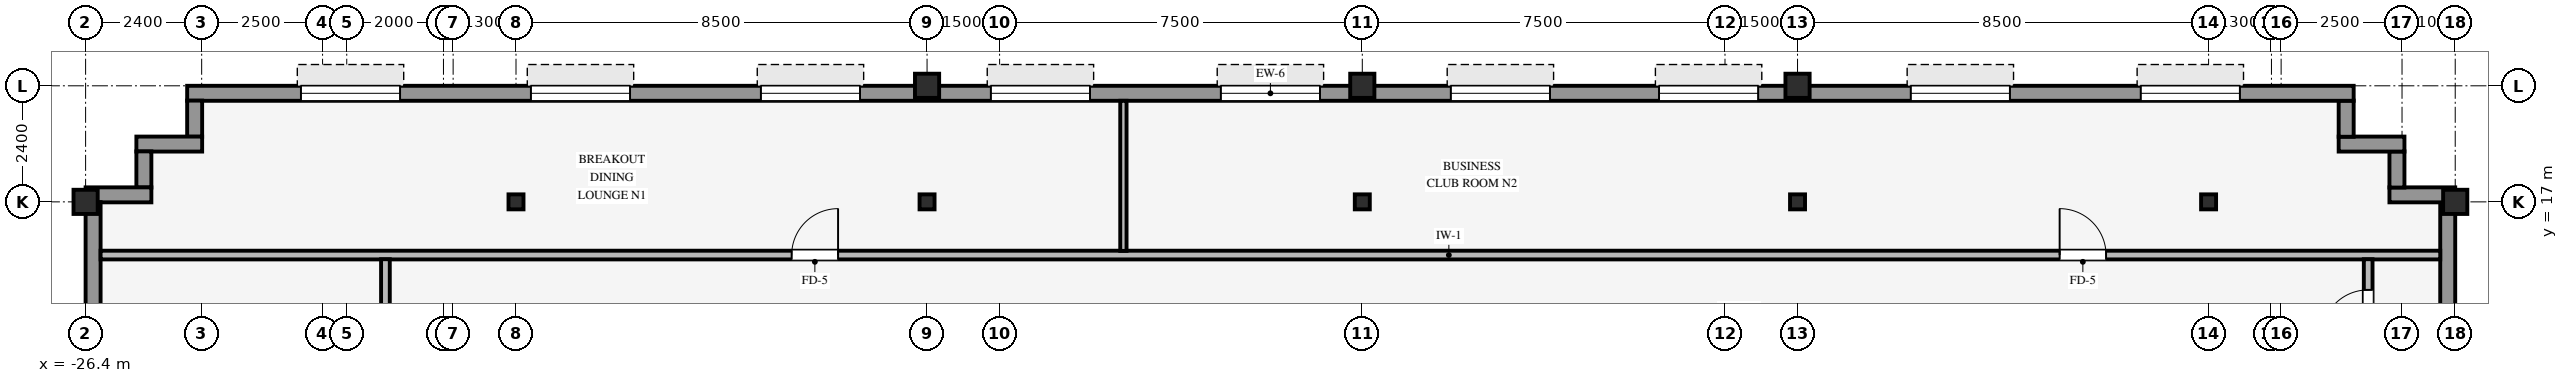
"""IFC4 building model, lengths in metres.
Left out: names, types, materials, properties, quantities, classifications, styles, units other than length and angle.
Written with IfcOpenShell. Run it as: python <this file> out.ifc"""

import sys

from ifc_helpers import new_model, si_unit, direction, frame, frame_2d, origin, origin_2d, place, context, subcontext, project, spatial, rectangle, hollow_rectangle, i_section, extrude, source, transform, mapped, element, fill, save


model = new_model("IFC4")
c1 = context("Model", 3, precision=1e-05, world=origin(), true_north=direction((0.0, 1.0)))
c2 = subcontext(c1, "Body", "Model", "MODEL_VIEW")
j1 = project(units=[si_unit("LENGTHUNIT", "METRE"), si_unit("PLANEANGLEUNIT", "RADIAN")], contexts=[c1])
p1 = place(None, origin())
s1 = spatial("IfcSite", under=j1, at=p1, CompositionType="ELEMENT")
p2 = place(p1, origin())
s2 = spatial("IfcBuilding", under=s1, at=p2, CompositionType="ELEMENT")
p3 = place(p2, frame((0.0, 0.0, 190.9)))
s3 = spatial("IfcBuildingStorey", under=s2, at=p3, CompositionType="ELEMENT", Elevation=190.9)
for number, where, z_axis, x_axis in (
    (1, (-26.4, 17.0, 0.0), (0.0, 0.0, 1.0), (1.0, 0.0, 0.0)),
    (2, (22.6, 17.0, 0.0), (0.0, 0.0, 1.0), (1.0, 0.0, 0.0)),
    (3, (-9.0, 19.4, 0.0), (0.0, 0.0, 1.0), (1.0, 0.0, 0.0)),
    (4, (0.0, 19.4, 0.0), (0.0, 0.0, 1.0), (1.0, 0.0, 0.0)),
    (5, (9.0, 19.4, 0.0), (0.0, 0.0, 1.0), (1.0, 0.0, 0.0)),
):
    element("IfcColumn", number, at=place(p3, frame(where, z_axis=z_axis, x_axis=x_axis)), inside=s3, PredefinedType="COLUMN", context=c2, shape_type="SweptSolid", body=[
        extrude(hollow_rectangle(XDim=0.5, YDim=0.5, WallThickness=0.032, InnerFilletRadius=0.032, OuterFilletRadius=0.064, at=origin_2d()), origin(), (0.0, 0.0, 1.0), 3.37),
    ])
for number, where, z_axis, x_axis in (
    (6, (0.0, 17.0, 0.0), (0.0, 0.0, 1.0), (1.0, 0.0, 0.0)),
    (7, (-17.5, 17.0, 0.0), (0.0, 0.0, 1.0), (1.0, 0.0, 0.0)),
    (8, (-9.0, 17.0, 0.0), (0.0, 0.0, 1.0), (1.0, 0.0, 0.0)),
    (9, (9.0, 17.0, 0.0), (0.0, 0.0, 1.0), (1.0, 0.0, 0.0)),
    (10, (17.5, 17.0, 0.0), (0.0, 0.0, 1.0), (1.0, 0.0, 0.0)),
):
    element("IfcColumn", number, at=place(p3, frame(where, z_axis=z_axis, x_axis=x_axis)), inside=s3, PredefinedType="COLUMN", context=c2, shape_type="SweptSolid", body=[
        extrude(i_section(OverallWidth=0.31, OverallDepth=0.31, WebThickness=0.015, FlangeThickness=0.015, FilletRadius=0.015, at=origin_2d()), origin(), (0.0, 0.0, 1.0), 3.37),
    ])
p4 = place(p3, frame((22.445, -20.794, 0.0), z_axis=(0.0, 0.0, 1.0), x_axis=(0.0, 1.0, 0.0)))
e11 = element("IfcWall", 11, at=p4, inside=s3, PredefinedType="STANDARD", context=c2, shape_type="SweptSolid", body=[
    extrude(rectangle(XDim=37.788, YDim=0.31, at=frame_2d((18.894, 0.0))), origin(), (0.0, 0.0, 1.0), 2.705),
])
p5 = place(p4, frame((16.474, 0.0, 0.0), z_axis=(0.0, 0.0, 1.0), x_axis=(-1.0, 0.0, 0.0)))
e12 = element("IfcOpeningElement", 12, at=p5, cuts=e11, PredefinedType="OPENING", context=c2, shape_type="SweptSolid", body=[
    extrude(rectangle(XDim=0.98, YDim=2.15, at=frame_2d((0.49, 1.075))), frame((0.0, 0.165, 0.0), z_axis=(0.0, -1.0, 0.0), x_axis=(1.0, 0.0, 0.0)), (0.0, 0.0, 1.0), 0.33),
])
p6 = place(p4, frame((1.581, 0.0, 0.8)))
e13 = element("IfcOpeningElement", 13, at=p6, cuts=e11, PredefinedType="OPENING", context=c2, shape_type="SweptSolid", body=[
    extrude(rectangle(XDim=1.25, YDim=1.52, at=frame_2d((0.625, 0.76))), frame((0.0, 0.165, 0.0), z_axis=(0.0, -1.0, 0.0), x_axis=(1.0, 0.0, 0.0)), (0.0, 0.0, 1.0), 0.33),
])
p7 = place(p4, frame((8.044, 0.0, 0.8)))
e14 = element("IfcOpeningElement", 14, at=p7, cuts=e11, PredefinedType="OPENING", context=c2, shape_type="SweptSolid", body=[
    extrude(rectangle(XDim=1.25, YDim=1.52, at=frame_2d((0.625, 0.76))), frame((0.0, 0.165, 0.0), z_axis=(0.0, -1.0, 0.0), x_axis=(1.0, 0.0, 0.0)), (0.0, 0.0, 1.0), 0.33),
])
p8 = place(p4, frame((13.156, 0.0, 0.8)))
e15 = element("IfcOpeningElement", 15, at=p8, cuts=e11, PredefinedType="OPENING", context=c2, shape_type="SweptSolid", body=[
    extrude(rectangle(XDim=1.25, YDim=1.52, at=frame_2d((0.625, 0.76))), frame((0.0, 0.165, 0.0), z_axis=(0.0, -1.0, 0.0), x_axis=(1.0, 0.0, 0.0)), (0.0, 0.0, 1.0), 0.33),
])
p9 = place(p4, frame((18.269, 0.0, 0.8)))
e16 = element("IfcOpeningElement", 16, at=p9, cuts=e11, PredefinedType="OPENING", context=c2, shape_type="SweptSolid", body=[
    extrude(rectangle(XDim=1.25, YDim=1.52, at=frame_2d((0.625, 0.76))), frame((0.0, 0.165, 0.0), z_axis=(0.0, -1.0, 0.0), x_axis=(1.0, 0.0, 0.0)), (0.0, 0.0, 1.0), 0.33),
])
p10 = place(p4, frame((22.482, 0.0, 0.8)))
e17 = element("IfcOpeningElement", 17, at=p10, cuts=e11, PredefinedType="OPENING", context=c2, shape_type="SweptSolid", body=[
    extrude(rectangle(XDim=1.25, YDim=1.52, at=frame_2d((0.625, 0.76))), frame((0.0, 0.165, 0.0), z_axis=(0.0, -1.0, 0.0), x_axis=(1.0, 0.0, 0.0)), (0.0, 0.0, 1.0), 0.33),
])
p11 = place(p4, frame((28.044, 0.0, 0.8)))
e18 = element("IfcOpeningElement", 18, at=p11, cuts=e11, PredefinedType="OPENING", context=c2, shape_type="SweptSolid", body=[
    extrude(rectangle(XDim=1.25, YDim=1.52, at=frame_2d((0.625, 0.76))), frame((0.0, 0.165, 0.0), z_axis=(0.0, -1.0, 0.0), x_axis=(1.0, 0.0, 0.0)), (0.0, 0.0, 1.0), 0.33),
])
p12 = place(p4, frame((33.607, 0.0, 0.8)))
e19 = element("IfcOpeningElement", 19, at=p12, cuts=e11, PredefinedType="OPENING", context=c2, shape_type="SweptSolid", body=[
    extrude(rectangle(XDim=1.25, YDim=1.52, at=frame_2d((0.625, 0.76))), frame((0.0, 0.165, 0.0), z_axis=(0.0, -1.0, 0.0), x_axis=(1.0, 0.0, 0.0)), (0.0, 0.0, 1.0), 0.33),
])
p13 = place(p3, frame((21.24, 17.145, 0.0), z_axis=(0.0, 0.0, 1.0), x_axis=(1.0, 0.0, 0.0)))
e20 = element("IfcWall", 20, at=p13, inside=s3, PredefinedType="STANDARD", context=c2, shape_type="SweptSolid", body=[
    extrude(rectangle(XDim=1.36, YDim=0.31, at=frame_2d((0.68, 0.0))), origin(), (0.0, 0.0, 1.0), 2.816),
])
p14 = place(p3, frame((21.395, 17.296, 0.0), z_axis=(0.0, 0.0, 1.0), x_axis=(0.0, 1.0, 0.0)))
e21 = element("IfcWall", 21, at=p14, inside=s3, PredefinedType="STANDARD", context=c2, shape_type="SweptSolid", body=[
    extrude(rectangle(XDim=0.748, YDim=0.31, at=frame_2d((0.374, 0.0))), origin(), (0.0, 0.0, 1.0), 2.816),
])
p15 = place(p3, frame((20.19, 18.195, 0.0), z_axis=(0.0, 0.0, 1.0), x_axis=(1.0, 0.0, 0.0)))
e22 = element("IfcWall", 22, at=p15, inside=s3, PredefinedType="STANDARD", context=c2, shape_type="SweptSolid", body=[
    extrude(rectangle(XDim=1.36, YDim=0.31, at=frame_2d((0.68, 0.0))), origin(), (0.0, 0.0, 1.0), 2.816),
])
p16 = place(p3, frame((20.345, 18.346, 0.0), z_axis=(0.0, 0.0, 1.0), x_axis=(0.0, 1.0, 0.0)))
e23 = element("IfcWall", 23, at=p16, inside=s3, PredefinedType="STANDARD", context=c2, shape_type="SweptSolid", body=[
    extrude(rectangle(XDim=0.748, YDim=0.31, at=frame_2d((0.374, 0.0))), origin(), (0.0, 0.0, 1.0), 2.816),
])
p17 = place(p3, frame((-24.3, 19.245, 0.0), z_axis=(0.0, 0.0, 1.0), x_axis=(1.0, 0.0, 0.0)))
e24 = element("IfcWall", 24, at=p17, inside=s3, PredefinedType="STANDARD", context=c2, shape_type="SweptSolid", body=[
    extrude(rectangle(XDim=44.8, YDim=0.31, at=frame_2d((22.4, 0.0))), origin(), (0.0, 0.0, 1.0), 2.705),
])
p18 = place(p17, frame((2.353, 0.0, 0.8)))
e25 = element("IfcOpeningElement", 25, at=p18, cuts=e24, PredefinedType="OPENING", context=c2, shape_type="SweptSolid", body=[
    extrude(rectangle(XDim=2.05, YDim=1.52, at=frame_2d((1.025, 0.76))), frame((0.0, 0.165, 0.0), z_axis=(0.0, -1.0, 0.0), x_axis=(1.0, 0.0, 0.0)), (0.0, 0.0, 1.0), 0.33),
])
p19 = place(p17, frame((7.108, 0.0, 0.8)))
e26 = element("IfcOpeningElement", 26, at=p19, cuts=e24, PredefinedType="OPENING", context=c2, shape_type="SweptSolid", body=[
    extrude(rectangle(XDim=2.05, YDim=1.52, at=frame_2d((1.025, 0.76))), frame((0.0, 0.165, 0.0), z_axis=(0.0, -1.0, 0.0), x_axis=(1.0, 0.0, 0.0)), (0.0, 0.0, 1.0), 0.33),
])
p20 = place(p17, frame((11.864, 0.0, 0.8)))
e27 = element("IfcOpeningElement", 27, at=p20, cuts=e24, PredefinedType="OPENING", context=c2, shape_type="SweptSolid", body=[
    extrude(rectangle(XDim=2.05, YDim=1.52, at=frame_2d((1.025, 0.76))), frame((0.0, 0.165, 0.0), z_axis=(0.0, -1.0, 0.0), x_axis=(1.0, 0.0, 0.0)), (0.0, 0.0, 1.0), 0.33),
])
p21 = place(p17, frame((16.619, 0.0, 0.8)))
e28 = element("IfcOpeningElement", 28, at=p21, cuts=e24, PredefinedType="OPENING", context=c2, shape_type="SweptSolid", body=[
    extrude(rectangle(XDim=2.05, YDim=1.52, at=frame_2d((1.025, 0.76))), frame((0.0, 0.165, 0.0), z_axis=(0.0, -1.0, 0.0), x_axis=(1.0, 0.0, 0.0)), (0.0, 0.0, 1.0), 0.33),
])
p22 = place(p17, frame((21.375, 0.0, 0.8)))
e29 = element("IfcOpeningElement", 29, at=p22, cuts=e24, PredefinedType="OPENING", context=c2, shape_type="SweptSolid", body=[
    extrude(rectangle(XDim=2.05, YDim=1.52, at=frame_2d((1.025, 0.76))), frame((0.0, 0.165, 0.0), z_axis=(0.0, -1.0, 0.0), x_axis=(1.0, 0.0, 0.0)), (0.0, 0.0, 1.0), 0.33),
])
p23 = place(p17, frame((26.131, 0.0, 0.8)))
e30 = element("IfcOpeningElement", 30, at=p23, cuts=e24, PredefinedType="OPENING", context=c2, shape_type="SweptSolid", body=[
    extrude(rectangle(XDim=2.05, YDim=1.52, at=frame_2d((1.025, 0.76))), frame((0.0, 0.165, 0.0), z_axis=(0.0, -1.0, 0.0), x_axis=(1.0, 0.0, 0.0)), (0.0, 0.0, 1.0), 0.33),
])
p24 = place(p17, frame((30.436, 0.0, 0.8)))
e31 = element("IfcOpeningElement", 31, at=p24, cuts=e24, PredefinedType="OPENING", context=c2, shape_type="SweptSolid", body=[
    extrude(rectangle(XDim=2.05, YDim=1.52, at=frame_2d((1.025, 0.76))), frame((0.0, 0.165, 0.0), z_axis=(0.0, -1.0, 0.0), x_axis=(1.0, 0.0, 0.0)), (0.0, 0.0, 1.0), 0.33),
])
p25 = place(p17, frame((35.642, 0.0, 0.8)))
e32 = element("IfcOpeningElement", 32, at=p25, cuts=e24, PredefinedType="OPENING", context=c2, shape_type="SweptSolid", body=[
    extrude(rectangle(XDim=2.05, YDim=1.52, at=frame_2d((1.025, 0.76))), frame((0.0, 0.165, 0.0), z_axis=(0.0, -1.0, 0.0), x_axis=(1.0, 0.0, 0.0)), (0.0, 0.0, 1.0), 0.33),
])
p26 = place(p17, frame((40.397, 0.0, 0.8)))
e33 = element("IfcOpeningElement", 33, at=p26, cuts=e24, PredefinedType="OPENING", context=c2, shape_type="SweptSolid", body=[
    extrude(rectangle(XDim=2.05, YDim=1.52, at=frame_2d((1.025, 0.76))), frame((0.0, 0.165, 0.0), z_axis=(0.0, -1.0, 0.0), x_axis=(1.0, 0.0, 0.0)), (0.0, 0.0, 1.0), 0.33),
])
p27 = place(p3, frame((-24.145, 18.346, 0.0), z_axis=(0.0, 0.0, 1.0), x_axis=(0.0, 1.0, 0.0)))
e34 = element("IfcWall", 34, at=p27, inside=s3, PredefinedType="STANDARD", context=c2, shape_type="SweptSolid", body=[
    extrude(rectangle(XDim=0.748, YDim=0.31, at=frame_2d((0.374, 0.0))), origin(), (0.0, 0.0, 1.0), 2.816),
])
p28 = place(p3, frame((-25.35, 18.195, 0.0), z_axis=(0.0, 0.0, 1.0), x_axis=(1.0, 0.0, 0.0)))
e35 = element("IfcWall", 35, at=p28, inside=s3, PredefinedType="STANDARD", context=c2, shape_type="SweptSolid", body=[
    extrude(rectangle(XDim=1.36, YDim=0.31, at=frame_2d((0.68, 0.0))), origin(), (0.0, 0.0, 1.0), 2.816),
])
p29 = place(p3, frame((-25.195, 17.296, 0.0), z_axis=(0.0, 0.0, 1.0), x_axis=(0.0, 1.0, 0.0)))
e36 = element("IfcWall", 36, at=p29, inside=s3, PredefinedType="STANDARD", context=c2, shape_type="SweptSolid", body=[
    extrude(rectangle(XDim=0.748, YDim=0.31, at=frame_2d((0.374, 0.0))), origin(), (0.0, 0.0, 1.0), 2.816),
])
p30 = place(p3, frame((-26.4, 17.145, 0.0), z_axis=(0.0, 0.0, 1.0), x_axis=(1.0, 0.0, 0.0)))
e37 = element("IfcWall", 37, at=p30, inside=s3, PredefinedType="STANDARD", context=c2, shape_type="SweptSolid", body=[
    extrude(rectangle(XDim=1.36, YDim=0.31, at=frame_2d((0.68, 0.0))), origin(), (0.0, 0.0, 1.0), 2.816),
])
p31 = place(p3, frame((-26.245, -20.794, 0.0), z_axis=(0.0, 0.0, 1.0), x_axis=(0.0, 1.0, 0.0)))
e38 = element("IfcWall", 38, at=p31, inside=s3, PredefinedType="STANDARD", context=c2, shape_type="SweptSolid", body=[
    extrude(rectangle(XDim=37.788, YDim=0.31, at=frame_2d((18.894, 0.0))), origin(), (0.0, 0.0, 1.0), 2.705),
])
p32 = place(p31, frame((24.744, 0.0, 0.0)))
e39 = element("IfcOpeningElement", 39, at=p32, cuts=e38, PredefinedType="OPENING", context=c2, shape_type="SweptSolid", body=[
    extrude(rectangle(XDim=1.05, YDim=2.1, at=frame_2d((0.525, 1.05))), frame((0.0, 0.165, 0.0), z_axis=(0.0, -1.0, 0.0), x_axis=(1.0, 0.0, 0.0)), (0.0, 0.0, 1.0), 0.33),
])
p33 = place(p31, frame((1.581, 0.0, 0.8)))
e40 = element("IfcOpeningElement", 40, at=p33, cuts=e38, PredefinedType="OPENING", context=c2, shape_type="SweptSolid", body=[
    extrude(rectangle(XDim=1.25, YDim=1.52, at=frame_2d((0.625, 0.76))), frame((0.0, 0.165, 0.0), z_axis=(0.0, -1.0, 0.0), x_axis=(1.0, 0.0, 0.0)), (0.0, 0.0, 1.0), 0.33),
])
p34 = place(p31, frame((8.044, 0.0, 0.8)))
e41 = element("IfcOpeningElement", 41, at=p34, cuts=e38, PredefinedType="OPENING", context=c2, shape_type="SweptSolid", body=[
    extrude(rectangle(XDim=1.25, YDim=1.52, at=frame_2d((0.625, 0.76))), frame((0.0, 0.165, 0.0), z_axis=(0.0, -1.0, 0.0), x_axis=(1.0, 0.0, 0.0)), (0.0, 0.0, 1.0), 0.33),
])
p35 = place(p31, frame((13.156, 0.0, 0.8)))
e42 = element("IfcOpeningElement", 42, at=p35, cuts=e38, PredefinedType="OPENING", context=c2, shape_type="SweptSolid", body=[
    extrude(rectangle(XDim=1.25, YDim=1.52, at=frame_2d((0.625, 0.76))), frame((0.0, 0.165, 0.0), z_axis=(0.0, -1.0, 0.0), x_axis=(1.0, 0.0, 0.0)), (0.0, 0.0, 1.0), 0.33),
])
p36 = place(p31, frame((18.269, 0.0, 0.8)))
e43 = element("IfcOpeningElement", 43, at=p36, cuts=e38, PredefinedType="OPENING", context=c2, shape_type="SweptSolid", body=[
    extrude(rectangle(XDim=1.25, YDim=1.52, at=frame_2d((0.625, 0.76))), frame((0.0, 0.165, 0.0), z_axis=(0.0, -1.0, 0.0), x_axis=(1.0, 0.0, 0.0)), (0.0, 0.0, 1.0), 0.33),
])
p37 = place(p31, frame((22.932, 0.0, 0.8)))
e44 = element("IfcOpeningElement", 44, at=p37, cuts=e38, PredefinedType="OPENING", context=c2, shape_type="SweptSolid", body=[
    extrude(rectangle(XDim=1.25, YDim=1.52, at=frame_2d((0.625, 0.76))), frame((0.0, 0.165, 0.0), z_axis=(0.0, -1.0, 0.0), x_axis=(1.0, 0.0, 0.0)), (0.0, 0.0, 1.0), 0.33),
])
p38 = place(p31, frame((28.044, 0.0, 0.8)))
e45 = element("IfcOpeningElement", 45, at=p38, cuts=e38, PredefinedType="OPENING", context=c2, shape_type="SweptSolid", body=[
    extrude(rectangle(XDim=1.25, YDim=1.52, at=frame_2d((0.625, 0.76))), frame((0.0, 0.165, 0.0), z_axis=(0.0, -1.0, 0.0), x_axis=(1.0, 0.0, 0.0)), (0.0, 0.0, 1.0), 0.33),
])
p39 = place(p31, frame((33.607, 0.0, 0.8)))
e46 = element("IfcOpeningElement", 46, at=p39, cuts=e38, PredefinedType="OPENING", context=c2, shape_type="SweptSolid", body=[
    extrude(rectangle(XDim=1.25, YDim=1.52, at=frame_2d((0.625, 0.76))), frame((0.0, 0.165, 0.0), z_axis=(0.0, -1.0, 0.0), x_axis=(1.0, 0.0, 0.0)), (0.0, 0.0, 1.0), 0.33),
])
p40 = place(p3, frame((-26.09, 15.9, 0.0), z_axis=(0.0, 0.0, 1.0), x_axis=(1.0, 0.0, 0.0)))
e47 = element("IfcWall", 47, at=p40, inside=s3, PredefinedType="PARTITIONING", context=c2, shape_type="SweptSolid", body=[
    extrude(rectangle(XDim=48.38, YDim=0.18, at=frame_2d((24.19, 0.0))), origin(), (0.0, 0.0, 1.0), 3.36),
])
p41 = place(p40, frame((14.29, 0.0, 0.0)))
e48 = element("IfcOpeningElement", 48, at=p41, cuts=e47, PredefinedType="OPENING", context=c2, shape_type="SweptSolid", body=[
    extrude(rectangle(XDim=0.96, YDim=2.1, at=frame_2d((0.48, 1.05))), frame((0.0, 0.1, 0.0), z_axis=(0.0, -1.0, 0.0), x_axis=(1.0, 0.0, 0.0)), (0.0, 0.0, 1.0), 0.2),
])
p42 = place(p40, frame((40.51, 0.0, 0.0)))
e49 = element("IfcOpeningElement", 49, at=p42, cuts=e47, PredefinedType="OPENING", context=c2, shape_type="SweptSolid", body=[
    extrude(rectangle(XDim=0.96, YDim=2.1, at=frame_2d((0.48, 1.05))), frame((0.0, 0.1, 0.0), z_axis=(0.0, -1.0, 0.0), x_axis=(1.0, 0.0, 0.0)), (0.0, 0.0, 1.0), 0.2),
])
p43 = place(p3, frame((-20.2, -15.814, 0.0), z_axis=(0.0, 0.0, 1.0), x_axis=(0.0, 1.0, 0.0)))
e50 = element("IfcWall", 50, at=p43, inside=s3, PredefinedType="PARTITIONING", context=c2, shape_type="SweptSolid", body=[
    extrude(rectangle(XDim=31.628, YDim=0.18, at=frame_2d((15.814, 0.0))), origin(), (0.0, 0.0, 1.0), 3.36),
])
p44 = place(p43, frame((15.334, 0.0, 0.0)))
e51 = element("IfcOpeningElement", 51, at=p44, cuts=e50, PredefinedType="OPENING", context=c2, shape_type="SweptSolid", body=[
    extrude(rectangle(XDim=0.96, YDim=2.1, at=frame_2d((0.48, 1.05))), frame((0.0, 0.1, 0.0), z_axis=(0.0, -1.0, 0.0), x_axis=(1.0, 0.0, 0.0)), (0.0, 0.0, 1.0), 0.2),
])
p45 = place(p43, frame((5.834, 0.0, 0.0)))
e52 = element("IfcOpeningElement", 52, at=p45, cuts=e50, PredefinedType="OPENING", context=c2, shape_type="SweptSolid", body=[
    extrude(rectangle(XDim=0.96, YDim=2.1, at=frame_2d((0.48, 1.05))), frame((0.0, 0.1, 0.0), z_axis=(0.0, -1.0, 0.0), x_axis=(1.0, 0.0, 0.0)), (0.0, 0.0, 1.0), 0.2),
])
p46 = place(p43, frame((24.834, 0.0, 0.0)))
e53 = element("IfcOpeningElement", 53, at=p46, cuts=e50, PredefinedType="OPENING", context=c2, shape_type="SweptSolid", body=[
    extrude(rectangle(XDim=0.96, YDim=2.1, at=frame_2d((0.48, 1.05))), frame((0.0, 0.1, 0.0), z_axis=(0.0, -1.0, 0.0), x_axis=(1.0, 0.0, 0.0)), (0.0, 0.0, 1.0), 0.2),
])
p47 = place(p3, frame((-4.94, 15.986, 0.0), z_axis=(0.0, 0.0, 1.0), x_axis=(0.0, 1.0, 0.0)))
e54 = element("IfcWall", 54, at=p47, inside=s3, PredefinedType="PARTITIONING", context=c2, shape_type="SweptSolid", body=[
    extrude(rectangle(XDim=3.104, YDim=0.13, at=frame_2d((1.552, 0.0))), origin(), (0.0, 0.0, 1.0), 3.36),
])
p48 = place(p3, frame((20.8, 13.586, 0.0), z_axis=(0.0, 0.0, 1.0), x_axis=(0.0, 1.0, 0.0)))
e55 = element("IfcWall", 55, at=p48, inside=s3, PredefinedType="PARTITIONING", context=c2, shape_type="SweptSolid", body=[
    extrude(rectangle(XDim=2.228, YDim=0.18, at=frame_2d((1.114, 0.0))), origin(), (0.0, 0.0, 1.0), 3.36),
])
p49 = place(p48, frame((0.634, 0.0, 0.0)))
e56 = element("IfcOpeningElement", 56, at=p49, cuts=e55, PredefinedType="OPENING", context=c2, shape_type="SweptSolid", body=[
    extrude(rectangle(XDim=0.96, YDim=2.1, at=frame_2d((0.48, 1.05))), frame((0.0, 0.1, 0.0), z_axis=(0.0, -1.0, 0.0), x_axis=(1.0, 0.0, 0.0)), (0.0, 0.0, 1.0), 0.2),
])
m1 = source(origin(), c2, "Body", "SweptSolid", [
    extrude(rectangle(XDim=2.05, YDim=1.52, at=frame_2d((1.025, 0.76))), frame((0.0, 0.03, 0.0), z_axis=(0.0, -1.0, 0.0), x_axis=(1.0, 0.0, 0.0)), (0.0, 0.0, 1.0), 0.06),
])
p50 = place(p18, origin())
e57 = element("IfcWindow", 57, at=p50, inside=s3, PartitioningType="SINGLE_PANEL", PredefinedType="WINDOW", context=c2, shape_type="MappedRepresentation", body=[
    mapped(m1, transform((0.0, 0.0, 0.0), scale=1.0)),
])
fill(e25, e57)
p51 = place(p19, origin())
e58 = element("IfcWindow", 58, at=p51, inside=s3, PartitioningType="SINGLE_PANEL", PredefinedType="WINDOW", context=c2, shape_type="MappedRepresentation", body=[
    mapped(m1, transform((0.0, 0.0, 0.0), scale=1.0)),
])
fill(e26, e58)
p52 = place(p20, origin())
e59 = element("IfcWindow", 59, at=p52, inside=s3, PartitioningType="SINGLE_PANEL", PredefinedType="WINDOW", context=c2, shape_type="MappedRepresentation", body=[
    mapped(m1, transform((0.0, 0.0, 0.0), scale=1.0)),
])
fill(e27, e59)
p53 = place(p21, origin())
e60 = element("IfcWindow", 60, at=p53, inside=s3, PartitioningType="SINGLE_PANEL", PredefinedType="WINDOW", context=c2, shape_type="MappedRepresentation", body=[
    mapped(m1, transform((0.0, 0.0, 0.0), scale=1.0)),
])
fill(e28, e60)
p54 = place(p22, origin())
e61 = element("IfcWindow", 61, at=p54, inside=s3, PartitioningType="SINGLE_PANEL", PredefinedType="WINDOW", context=c2, shape_type="MappedRepresentation", body=[
    mapped(m1, transform((0.0, 0.0, 0.0), scale=1.0)),
])
fill(e29, e61)
p55 = place(p23, origin())
e62 = element("IfcWindow", 62, at=p55, inside=s3, PartitioningType="SINGLE_PANEL", PredefinedType="WINDOW", context=c2, shape_type="MappedRepresentation", body=[
    mapped(m1, transform((0.0, 0.0, 0.0), scale=1.0)),
])
fill(e30, e62)
p56 = place(p24, origin())
e63 = element("IfcWindow", 63, at=p56, inside=s3, PartitioningType="SINGLE_PANEL", PredefinedType="WINDOW", context=c2, shape_type="MappedRepresentation", body=[
    mapped(m1, transform((0.0, 0.0, 0.0), scale=1.0)),
])
fill(e31, e63)
p57 = place(p25, origin())
e64 = element("IfcWindow", 64, at=p57, inside=s3, PartitioningType="SINGLE_PANEL", PredefinedType="WINDOW", context=c2, shape_type="MappedRepresentation", body=[
    mapped(m1, transform((0.0, 0.0, 0.0), scale=1.0)),
])
fill(e32, e64)
p58 = place(p26, origin())
e65 = element("IfcWindow", 65, at=p58, inside=s3, PartitioningType="SINGLE_PANEL", PredefinedType="WINDOW", context=c2, shape_type="MappedRepresentation", body=[
    mapped(m1, transform((0.0, 0.0, 0.0), scale=1.0)),
])
fill(e33, e65)
m2 = source(origin(), c2, "Body", "SweptSolid", [
    extrude(rectangle(XDim=0.96, YDim=2.1, at=frame_2d((0.48, 1.05))), frame((0.0, 0.025, 0.0), z_axis=(0.0, -1.0, 0.0), x_axis=(1.0, 0.0, 0.0)), (0.0, 0.0, 1.0), 0.05),
])
p59 = place(p41, origin())
e66 = element("IfcDoor", 66, at=p59, inside=s3, OperationType="SINGLE_SWING_RIGHT", PredefinedType="DOOR", context=c2, shape_type="MappedRepresentation", body=[
    mapped(m2, transform((0.0, 0.0, 0.0), scale=1.0)),
])
fill(e48, e66)
p60 = place(p42, origin())
e67 = element("IfcDoor", 67, at=p60, inside=s3, OperationType="SINGLE_SWING_LEFT", PredefinedType="DOOR", context=c2, shape_type="MappedRepresentation", body=[
    mapped(m2, transform((0.0, 0.0, 0.0), scale=1.0)),
])
fill(e49, e67)
p61 = place(p49, origin())
e68 = element("IfcDoor", 68, at=p61, inside=s3, OperationType="SINGLE_SWING_LEFT", PredefinedType="DOOR", context=c2, shape_type="MappedRepresentation", body=[
    mapped(m2, transform((0.0, 0.0, 0.0), scale=1.0)),
])
fill(e56, e68)
save(model, sys.argv[1])
